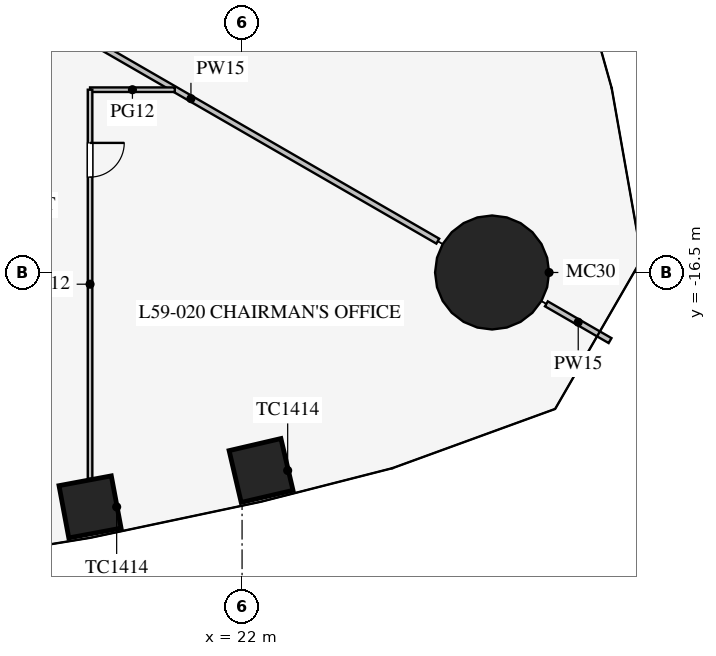
"""IFC4 building model, lengths in metres.
Left out: names, types, materials, properties, quantities, classifications, styles, units other than length and angle.
Written with IfcOpenShell. Run it as: python <this file> out.ifc"""

import sys

from ifc_helpers import new_model, si_unit, direction, frame, frame_2d, origin, origin_2d, place, context, subcontext, project, spatial, rectangle, circle, extrude, element, fill, save


model = new_model("IFC4")
c1 = context("Model", 3, precision=1e-05, world=origin(), true_north=direction((0.0, 1.0)))
c2 = subcontext(c1, "Body", "Model", "MODEL_VIEW")
j1 = project(units=[si_unit("LENGTHUNIT", "METRE"), si_unit("PLANEANGLEUNIT", "RADIAN")], contexts=[c1])
p1 = place(None, origin())
s1 = spatial("IfcSite", under=j1, at=p1, CompositionType="ELEMENT")
p2 = place(p1, origin())
s2 = spatial("IfcBuilding", under=s1, at=p2, CompositionType="ELEMENT")
p3 = place(p2, frame((0.0, 0.0, 256.9)))
s3 = spatial("IfcBuildingStorey", under=s2, at=p3, CompositionType="ELEMENT", Elevation=256.9)
for number, where, z_axis, x_axis in (
    (1, (18.0, -22.669, 0.0), (0.0, 0.0, 1.0), (0.983, 0.184, 0.0)),
    (2, (22.5, -21.71, 0.0), (0.0, 0.0, 1.0), (0.974, 0.227, 0.0)),
):
    element("IfcColumn", number, at=place(p3, frame(where, z_axis=z_axis, x_axis=x_axis)), inside=s3, PredefinedType="COLUMN", context=c2, shape_type="SweptSolid", body=[
        extrude(rectangle(XDim=1.4, YDim=1.4, at=origin_2d()), origin(), (0.0, 0.0, 1.0), 4.2),
    ])
p4 = place(p3, frame((28.579, -16.5, 0.0), z_axis=(0.0, 0.0, 1.0), x_axis=(1.0, 0.0, 0.0)))
e3 = element("IfcColumn", 3, at=p4, inside=s3, PredefinedType="COLUMN", context=c2, shape_type="SweptSolid", body=[
    extrude(circle(Radius=1.5, at=origin_2d()), origin(), (0.0, 0.0, 1.0), 4.2),
])
p5 = place(p3, frame((10.97, -13.0, 0.0), z_axis=(0.0, 0.0, 1.0), x_axis=(0.499995765644, 0.866027848477, 0.0)))
e4 = element("IfcWall", 4, at=p5, inside=s3, PredefinedType="SHEAR", context=c2, shape_type="SweptSolid", body=[
    extrude(rectangle(XDim=11.547, YDim=0.7, at=frame_2d((5.773, 0.0))), origin(), (0.0, 0.0, 1.0), 4.2),
])
p6 = place(p3, frame((14.159, -8.175, 0.0), z_axis=(0.0, 0.0, 1.0), x_axis=(0.866027028085, -0.499997186618, 0.0)))
e5 = element("IfcWall", 5, at=p6, inside=s3, PredefinedType="PARTITIONING", context=c2, shape_type="SweptSolid", body=[
    extrude(rectangle(XDim=15.0, YDim=0.15, at=frame_2d((7.5, 0.0))), origin(), (0.0, 0.0, 1.0), 2.4),
])
p7 = place(p3, frame((30.008, -17.325, 0.0), z_axis=(0.0, 0.0, 1.0), x_axis=(0.866013246922, -0.500021055713, 0.0)))
e6 = element("IfcWall", 6, at=p7, inside=s3, PredefinedType="PARTITIONING", context=c2, shape_type="SweptSolid", body=[
    extrude(rectangle(XDim=1.935, YDim=0.15, at=frame_2d((0.967, 0.0))), origin(), (0.0, 0.0, 1.0), 2.4),
])
p8 = place(p3, frame((18.0, -11.69, 0.0), z_axis=(0.0, 0.0, 1.0), x_axis=(1.0, 0.0, 0.0)))
e7 = element("IfcWall", 7, at=p8, inside=s3, PredefinedType="PARTITIONING", context=c2, shape_type="SweptSolid", body=[
    extrude(rectangle(XDim=2.23, YDim=0.12, at=frame_2d((1.115, 0.0))), origin(), (0.0, 0.0, 1.0), 2.9),
])
p9 = place(p3, frame((18.0, -11.69, 0.0), z_axis=(0.0, 0.0, 1.0), x_axis=(0.0, -1.0, 0.0)))
e8 = element("IfcWall", 8, at=p9, inside=s3, PredefinedType="PARTITIONING", context=c2, shape_type="SweptSolid", body=[
    extrude(rectangle(XDim=10.237, YDim=0.12, at=frame_2d((5.118, 0.0))), origin(), (0.0, 0.0, 1.0), 2.6),
])
p10 = place(p9, frame((1.4, 0.0, 0.15)))
e9 = element("IfcOpeningElement", 9, at=p10, cuts=e8, PredefinedType="OPENING", context=c2, shape_type="SweptSolid", body=[
    extrude(rectangle(XDim=0.9, YDim=2.1, at=frame_2d((0.45, 1.05))), frame((0.0, 0.07, 0.0), z_axis=(0.0, -1.0, 0.0), x_axis=(1.0, 0.0, 0.0)), (0.0, 0.0, 1.0), 0.14),
])
p11 = place(p10, origin())
e10 = element("IfcDoor", 10, at=p11, inside=s3, OperationType="SINGLE_SWING_LEFT", PredefinedType="DOOR", context=c2, shape_type="SweptSolid", body=[
    extrude(rectangle(XDim=0.9, YDim=2.1, at=frame_2d((0.45, 1.05))), frame((0.0, 0.025, 0.0), z_axis=(0.0, -1.0, 0.0), x_axis=(1.0, 0.0, 0.0)), (0.0, 0.0, 1.0), 0.05),
])
fill(e9, e10)
save(model, sys.argv[1])
